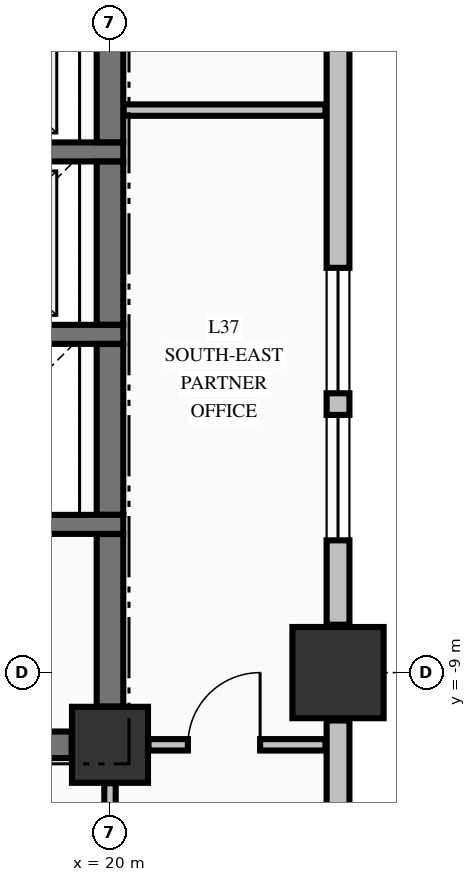
"""IFC4 building model, lengths in metres.
Left out: names, types, materials, properties, quantities, classifications, styles, units other than length and angle.
Written with IfcOpenShell. Run it as: python <this file> out.ifc"""

import sys

from ifc_helpers import new_model, si_unit, direction, frame, frame_2d, origin, origin_2d, place, context, subcontext, project, spatial, rectangle, extrude, element, fill, save


model = new_model("IFC4")
c1 = context("Model", 3, precision=1e-05, world=origin(), true_north=direction((0.0, 1.0)))
c2 = subcontext(c1, "Body", "Model", "MODEL_VIEW")
j1 = project(units=[si_unit("LENGTHUNIT", "METRE"), si_unit("PLANEANGLEUNIT", "RADIAN")], contexts=[c1])
p1 = place(None, origin())
s1 = spatial("IfcSite", under=j1, at=p1, CompositionType="ELEMENT")
p2 = place(p1, origin())
s2 = spatial("IfcBuilding", under=s1, at=p2, CompositionType="ELEMENT")
p3 = place(p2, frame((0.0, 0.0, 146.34)))
s3 = spatial("IfcBuildingStorey", under=s2, at=p3, CompositionType="ELEMENT", Elevation=146.34)
p4 = place(p3, frame((23.0, -9.0, -0.25), z_axis=(0.0, 0.0, 1.0), x_axis=(1.0, 0.0, 0.0)))
e1 = element("IfcColumn", 1, at=p4, inside=s3, PredefinedType="COLUMN", context=c2, shape_type="SweptSolid", body=[
    extrude(rectangle(XDim=1.2, YDim=1.2, at=origin_2d()), origin(), (0.0, 0.0, 1.0), 3.57),
])
p5 = place(p3, frame((20.0, -9.95, -0.25), z_axis=(0.0, 0.0, 1.0), x_axis=(1.0, 0.0, 0.0)))
e2 = element("IfcColumn", 2, at=p5, inside=s3, PredefinedType="COLUMN", context=c2, shape_type="SweptSolid", body=[
    extrude(rectangle(XDim=1.0, YDim=1.0, at=origin_2d()), origin(), (0.0, 0.0, 1.0), 3.57),
])
p6 = place(p3, frame((23.0, -20.37, 0.0), z_axis=(0.0, 0.0, 1.0), x_axis=(0.0, 1.0, 0.0)))
e3 = element("IfcWall", 3, at=p6, inside=s3, PredefinedType="STANDARD", context=c2, shape_type="SweptSolid", body=[
    extrude(rectangle(XDim=10.74, YDim=0.3, at=frame_2d((5.37, 0.0))), origin(), (0.0, 0.0, 1.0), 2.712),
])
p7 = place(p3, frame((23.0, -8.37, 0.0), z_axis=(0.0, 0.0, 1.0), x_axis=(0.0, 1.0, 0.0)))
e4 = element("IfcWall", 4, at=p7, inside=s3, PredefinedType="STANDARD", context=c2, shape_type="SweptSolid", body=[
    extrude(rectangle(XDim=7.74, YDim=0.3, at=frame_2d((3.87, 0.0))), origin(), (0.0, 0.0, 1.0), 2.712),
])
p8 = place(p7, frame((1.11, 0.0, 0.8)))
e5 = element("IfcOpeningElement", 5, at=p8, cuts=e4, PredefinedType="OPENING", context=c2, shape_type="SweptSolid", body=[
    extrude(rectangle(XDim=1.65, YDim=1.7, at=frame_2d((0.825, 0.85))), frame((0.0, 0.16, 0.0), z_axis=(0.0, -1.0, 0.0), x_axis=(1.0, 0.0, 0.0)), (0.0, 0.0, 1.0), 0.32),
])
p9 = place(p7, frame((3.045, 0.0, 0.8)))
e6 = element("IfcOpeningElement", 6, at=p9, cuts=e4, PredefinedType="OPENING", context=c2, shape_type="SweptSolid", body=[
    extrude(rectangle(XDim=1.65, YDim=1.7, at=frame_2d((0.825, 0.85))), frame((0.0, 0.16, 0.0), z_axis=(0.0, -1.0, 0.0), x_axis=(1.0, 0.0, 0.0)), (0.0, 0.0, 1.0), 0.32),
])
p10 = place(p3, frame((14.7, -9.95, 0.0), z_axis=(0.0, 0.0, 1.0), x_axis=(1.0, 0.0, 0.0)))
e7 = element("IfcWall", 7, at=p10, inside=s3, PredefinedType="SHEAR", context=c2, shape_type="SweptSolid", body=[
    extrude(rectangle(XDim=4.796, YDim=0.35, at=frame_2d((2.398, 0.0))), origin(), (0.0, 0.0, 1.0), 3.32),
])
p11 = place(p10, frame((0.65, 0.0, 0.0)))
e8 = element("IfcOpeningElement", 8, at=p11, cuts=e7, PredefinedType="OPENING", context=c2, shape_type="SweptSolid", body=[
    extrude(rectangle(XDim=1.2, YDim=2.15, at=frame_2d((0.6, 1.075))), frame((0.0, 0.185, 0.0), z_axis=(0.0, -1.0, 0.0), x_axis=(1.0, 0.0, 0.0)), (0.0, 0.0, 1.0), 0.37),
])
for number, where, z_axis, x_axis in (
    (9, (17.025, -7.05, 0.0), (0.0, 0.0, 1.0), (1.0, 0.0, 0.0)),
    (10, (17.025, -4.55, 0.0), (0.0, 0.0, 1.0), (1.0, 0.0, 0.0)),
    (11, (17.025, -2.15, 0.0), (0.0, 0.0, 1.0), (1.0, 0.0, 0.0)),
):
    element("IfcWall", number, at=place(p3, frame(where, z_axis=z_axis, x_axis=x_axis)), inside=s3, PredefinedType="SOLIDWALL", context=c2, shape_type="SweptSolid", body=[
        extrude(rectangle(XDim=3.15, YDim=0.25, at=frame_2d((1.575, 0.0))), origin(), (0.0, 0.0, 1.0), 3.32),
    ])
p12 = place(p3, frame((20.506, -9.95, 0.0), z_axis=(0.0, 0.0, 1.0), x_axis=(1.0, 0.0, 0.0)))
e12 = element("IfcWall", 12, at=p12, inside=s3, PredefinedType="PARTITIONING", context=c2, shape_type="SweptSolid", body=[
    extrude(rectangle(XDim=2.329, YDim=0.15, at=frame_2d((1.165, 0.0))), origin(), (0.0, 0.0, 1.0), 3.32),
])
p13 = place(p12, frame((0.519, 0.0, 0.0)))
e13 = element("IfcOpeningElement", 13, at=p13, cuts=e12, PredefinedType="OPENING", context=c2, shape_type="SweptSolid", body=[
    extrude(rectangle(XDim=0.95, YDim=2.15, at=frame_2d((0.475, 1.075))), frame((0.0, 0.085, 0.0), z_axis=(0.0, -1.0, 0.0), x_axis=(1.0, 0.0, 0.0)), (0.0, 0.0, 1.0), 0.17),
])
p14 = place(p3, frame((20.178, -1.6, 0.0), z_axis=(0.0, 0.0, 1.0), x_axis=(1.0, 0.0, 0.0)))
e14 = element("IfcWall", 14, at=p14, inside=s3, PredefinedType="PARTITIONING", context=c2, shape_type="SweptSolid", body=[
    extrude(rectangle(XDim=2.657, YDim=0.15, at=frame_2d((1.329, 0.0))), origin(), (0.0, 0.0, 1.0), 3.32),
])
p15 = place(p3, frame((20.0, -9.446, 0.0), z_axis=(0.0, 0.0, 1.0), x_axis=(0.0, 1.0, 0.0)))
e15 = element("IfcWall", 15, at=p15, inside=s3, PredefinedType="SHEAR", context=c2, shape_type="SweptSolid", body=[
    extrude(rectangle(XDim=2.269, YDim=0.35, at=frame_2d((1.135, 0.0))), origin(), (0.0, 0.0, 1.0), 3.32),
])
p16 = place(p3, frame((20.0, -6.923, 0.0), z_axis=(0.0, 0.0, 1.0), x_axis=(0.0, 1.0, 0.0)))
e16 = element("IfcWall", 16, at=p16, inside=s3, PredefinedType="SHEAR", context=c2, shape_type="SweptSolid", body=[
    extrude(rectangle(XDim=2.246, YDim=0.35, at=frame_2d((1.123, 0.0))), origin(), (0.0, 0.0, 1.0), 3.32),
])
p17 = place(p3, frame((20.0, -4.423, 0.0), z_axis=(0.0, 0.0, 1.0), x_axis=(0.0, 1.0, 0.0)))
e17 = element("IfcWall", 17, at=p17, inside=s3, PredefinedType="SHEAR", context=c2, shape_type="SweptSolid", body=[
    extrude(rectangle(XDim=2.146, YDim=0.35, at=frame_2d((1.073, 0.0))), origin(), (0.0, 0.0, 1.0), 3.32),
])
p18 = place(p3, frame((20.0, -2.023, 0.0), z_axis=(0.0, 0.0, 1.0), x_axis=(0.0, 1.0, 0.0)))
e18 = element("IfcWall", 18, at=p18, inside=s3, PredefinedType="SHEAR", context=c2, shape_type="SweptSolid", body=[
    extrude(rectangle(XDim=1.519, YDim=0.35, at=frame_2d((0.76, 0.0))), origin(), (0.0, 0.0, 1.0), 3.32),
])
p19 = place(p3, frame((20.0, -12.472, 0.0), z_axis=(0.0, 0.0, 1.0), x_axis=(0.0, 1.0, 0.0)))
e19 = element("IfcWall", 19, at=p19, inside=s3, PredefinedType="PARTITIONING", context=c2, shape_type="SweptSolid", body=[
    extrude(rectangle(XDim=2.016, YDim=0.15, at=frame_2d((1.008, 0.0))), origin(), (0.0, 0.0, 1.0), 2.81),
])
p20 = place(p19, frame((0.747, 0.0, 0.0)))
e20 = element("IfcOpeningElement", 20, at=p20, cuts=e19, PredefinedType="OPENING", context=c2, shape_type="SweptSolid", body=[
    extrude(rectangle(XDim=0.95, YDim=2.15, at=frame_2d((0.475, 1.075))), frame((0.0, 0.085, 0.0), z_axis=(0.0, -1.0, 0.0), x_axis=(1.0, 0.0, 0.0)), (0.0, 0.0, 1.0), 0.17),
])
p21 = place(p8, origin())
e21 = element("IfcWindow", 21, at=p21, inside=s3, PartitioningType="SINGLE_PANEL", PredefinedType="WINDOW", context=c2, shape_type="SweptSolid", body=[
    extrude(rectangle(XDim=1.65, YDim=1.7, at=frame_2d((0.825, 0.85))), frame((0.0, 0.03, 0.0), z_axis=(0.0, -1.0, 0.0), x_axis=(1.0, 0.0, 0.0)), (0.0, 0.0, 1.0), 0.06),
])
fill(e5, e21)
p22 = place(p9, origin())
e22 = element("IfcWindow", 22, at=p22, inside=s3, PartitioningType="SINGLE_PANEL", PredefinedType="WINDOW", context=c2, shape_type="SweptSolid", body=[
    extrude(rectangle(XDim=1.65, YDim=1.7, at=frame_2d((0.825, 0.85))), frame((0.0, 0.03, 0.0), z_axis=(0.0, -1.0, 0.0), x_axis=(1.0, 0.0, 0.0)), (0.0, 0.0, 1.0), 0.06),
])
fill(e6, e22)
p23 = place(p13, origin())
e23 = element("IfcDoor", 23, at=p23, inside=s3, OperationType="SINGLE_SWING_RIGHT", PredefinedType="DOOR", context=c2, shape_type="SweptSolid", body=[
    extrude(rectangle(XDim=0.95, YDim=2.15, at=frame_2d((0.475, 1.075))), frame((0.0, 0.025, 0.0), z_axis=(0.0, -1.0, 0.0), x_axis=(1.0, 0.0, 0.0)), (0.0, 0.0, 1.0), 0.05),
])
fill(e13, e23)
save(model, sys.argv[1])
